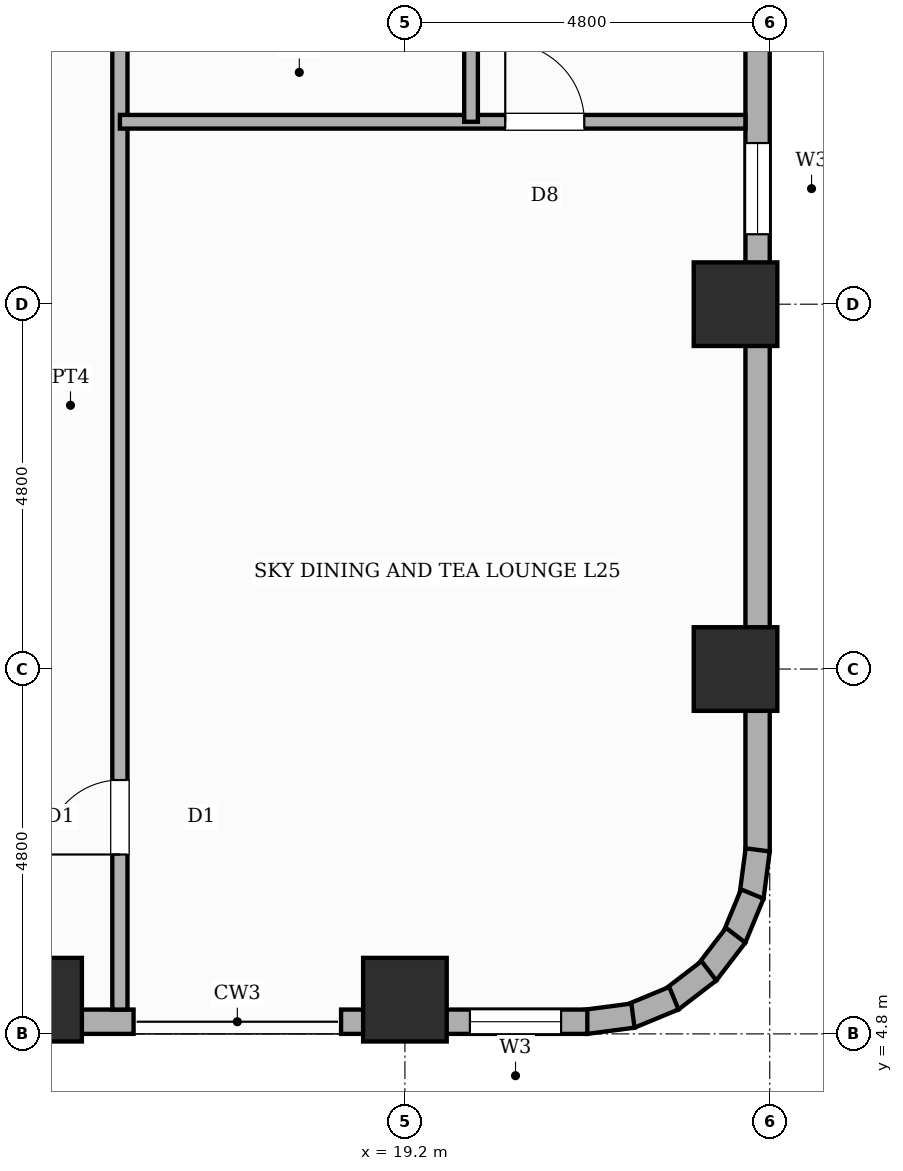
"""IFC4 building model, lengths in metres.
Left out: names, types, materials, properties, quantities, classifications, styles, units other than length and angle.
Written with IfcOpenShell. Run it as: python <this file> out.ifc"""

import sys

from ifc_helpers import new_model, si_unit, direction, frame, frame_2d, origin, origin_2d, place, context, subcontext, project, spatial, rectangle, extrude, element, fill, save


model = new_model("IFC4")
c1 = context("Model", 3, precision=1e-05, world=origin(), true_north=direction((0.0, 1.0)))
c2 = subcontext(c1, "Body", "Model", "MODEL_VIEW")
j1 = project(units=[si_unit("LENGTHUNIT", "METRE"), si_unit("PLANEANGLEUNIT", "RADIAN")], contexts=[c1])
p1 = place(None, origin())
s1 = spatial("IfcSite", under=j1, at=p1, CompositionType="ELEMENT")
p2 = place(p1, origin())
s2 = spatial("IfcBuilding", under=s1, at=p2, CompositionType="ELEMENT")
p3 = place(p2, frame((0.0, 0.0, 97.0)))
s3 = spatial("IfcBuildingStorey", under=s2, at=p3, CompositionType="ELEMENT", Elevation=97.0)
for number, where, z_axis, x_axis in (
    (1, (14.4, 5.25, 0.0), (0.0, 0.0, 1.0), (1.0, 0.0, 0.0)),
    (2, (19.2, 5.25, 0.0), (0.0, 0.0, 1.0), (1.0, 0.0, 0.0)),
    (3, (23.55, 9.6, 0.0), (0.0, 0.0, 1.0), (1.0, 0.0, 0.0)),
    (4, (23.55, 14.4, 0.0), (0.0, 0.0, 1.0), (1.0, 0.0, 0.0)),
):
    element("IfcColumn", number, at=place(p3, frame(where, z_axis=z_axis, x_axis=x_axis)), inside=s3, PredefinedType="COLUMN", context=c2, shape_type="SweptSolid", body=[
        extrude(rectangle(XDim=1.1, YDim=1.1, at=origin_2d()), origin(), (0.0, 0.0, 1.0), 4.8),
    ])
p4 = place(p3, frame((23.84, 26.4, 0.0), z_axis=(0.0, 0.0, 1.0), x_axis=(0.0, -1.0, 0.0)))
e5 = element("IfcWall", 5, at=p4, inside=s3, PredefinedType="STANDARD", context=c2, shape_type="SweptSolid", body=[
    extrude(rectangle(XDim=19.2, YDim=0.32, at=frame_2d((9.6, 0.0))), origin(), (0.0, 0.0, 1.0), 3.68),
])
p5 = place(p4, frame((9.88, 0.0, 0.8)))
e6 = element("IfcOpeningElement", 6, at=p5, cuts=e5, PredefinedType="OPENING", context=c2, shape_type="SweptSolid", body=[
    extrude(rectangle(XDim=1.2, YDim=1.8, at=frame_2d((0.6, 0.9))), frame((0.0, 0.17, 0.0), z_axis=(0.0, -1.0, 0.0), x_axis=(1.0, 0.0, 0.0)), (0.0, 0.0, 1.0), 0.34),
])
p6 = place(p4, frame((5.415, 0.0, 0.8)))
e7 = element("IfcOpeningElement", 7, at=p6, cuts=e5, PredefinedType="OPENING", context=c2, shape_type="SweptSolid", body=[
    extrude(rectangle(XDim=0.95, YDim=1.8, at=frame_2d((0.475, 0.9))), frame((0.0, 0.17, 0.0), z_axis=(0.0, -1.0, 0.0), x_axis=(1.0, 0.0, 0.0)), (0.0, 0.0, 1.0), 0.34),
])
p7 = place(p4, frame((0.965, 0.0, 0.45)))
e8 = element("IfcOpeningElement", 8, at=p7, cuts=e5, PredefinedType="OPENING", context=c2, shape_type="SweptSolid", body=[
    extrude(rectangle(XDim=0.6, YDim=1.8, at=frame_2d((0.3, 0.9))), frame((0.0, 0.17, 0.0), z_axis=(0.0, -1.0, 0.0), x_axis=(1.0, 0.0, 0.0)), (0.0, 0.0, 1.0), 0.34),
])
p8 = place(p3, frame((23.841, 7.221, 0.0), z_axis=(0.0, 0.0, 1.0), x_axis=(-0.130504898859, -0.991447664465, 0.0)))
e9 = element("IfcWall", 9, at=p8, inside=s3, PredefinedType="STANDARD", context=c2, shape_type="SweptSolid", body=[
    extrude(rectangle(XDim=0.627, YDim=0.32, at=frame_2d((0.313, 0.0))), origin(), (0.0, 0.0, 1.0), 4.5),
])
p9 = place(p3, frame((23.771, 6.64, 0.0), z_axis=(0.0, 0.0, 1.0), x_axis=(-0.382787856107, -0.923836271867, 0.0)))
e10 = element("IfcWall", 10, at=p9, inside=s3, PredefinedType="STANDARD", context=c2, shape_type="SweptSolid", body=[
    extrude(rectangle(XDim=0.626, YDim=0.32, at=frame_2d((0.313, 0.0))), origin(), (0.0, 0.0, 1.0), 4.5),
])
p10 = place(p3, frame((23.552, 6.097, 0.0), z_axis=(0.0, 0.0, 1.0), x_axis=(-0.608693302629, -0.793405610854, 0.0)))
e11 = element("IfcWall", 11, at=p10, inside=s3, PredefinedType="STANDARD", context=c2, shape_type="SweptSolid", body=[
    extrude(rectangle(XDim=0.626, YDim=0.32, at=frame_2d((0.313, 0.0))), origin(), (0.0, 0.0, 1.0), 4.5),
])
p11 = place(p3, frame((23.2, 5.63, 0.0), z_axis=(0.0, 0.0, 1.0), x_axis=(-0.7932174212, -0.608938521285, 0.0)))
e12 = element("IfcWall", 12, at=p11, inside=s3, PredefinedType="STANDARD", context=c2, shape_type="SweptSolid", body=[
    extrude(rectangle(XDim=0.627, YDim=0.32, at=frame_2d((0.313, 0.0))), origin(), (0.0, 0.0, 1.0), 4.5),
])
for number, where, z_axis, x_axis in (
    (13, (22.739, 5.269, 0.0), (0.0, 0.0, 1.0), (-0.924, -0.383, 0.0)),
    (14, (22.2, 5.04, 0.0), (0.0, 0.0, 1.0), (-0.991, -0.131, 0.0)),
):
    element("IfcWall", number, at=place(p3, frame(where, z_axis=z_axis, x_axis=x_axis)), inside=s3, PredefinedType="STANDARD", context=c2, shape_type="SweptSolid", body=[
        extrude(rectangle(XDim=0.626, YDim=0.32, at=frame_2d((0.313, 0.0))), origin(), (0.0, 0.0, 1.0), 4.5),
    ])
p12 = place(p3, frame((21.6, 4.96, 0.0), z_axis=(0.0, 0.0, 1.0), x_axis=(-1.0, 0.0, 0.0)))
e15 = element("IfcWall", 15, at=p12, inside=s3, PredefinedType="STANDARD", context=c2, shape_type="SweptSolid", body=[
    extrude(rectangle(XDim=3.24, YDim=0.32, at=frame_2d((1.62, 0.0))), origin(), (0.0, 0.0, 1.0), 3.68),
])
p13 = place(p12, frame((0.345, 0.0, 0.8)))
e16 = element("IfcOpeningElement", 16, at=p13, cuts=e15, PredefinedType="OPENING", context=c2, shape_type="SweptSolid", body=[
    extrude(rectangle(XDim=1.2, YDim=1.8, at=frame_2d((0.6, 0.9))), frame((0.0, 0.17, 0.0), z_axis=(0.0, -1.0, 0.0), x_axis=(1.0, 0.0, 0.0)), (0.0, 0.0, 1.0), 0.34),
])
p14 = place(p3, frame((15.63, 4.96, 0.0), z_axis=(0.0, 0.0, 1.0), x_axis=(-1.0, 0.0, 0.0)))
e17 = element("IfcWall", 17, at=p14, inside=s3, PredefinedType="STANDARD", context=c2, shape_type="SweptSolid", body=[
    extrude(rectangle(XDim=2.21, YDim=0.32, at=frame_2d((1.105, 0.0))), origin(), (0.0, 0.0, 1.0), 3.68),
])
p15 = place(p3, frame((15.45, 5.12, 0.0), z_axis=(0.0, 0.0, 1.0), x_axis=(0.0, 1.0, 0.0)))
e18 = element("IfcWall", 18, at=p15, inside=s3, PredefinedType="PARTITIONING", context=c2, shape_type="SweptSolid", body=[
    extrude(rectangle(XDim=20.63, YDim=0.2, at=frame_2d((10.315, 0.0))), origin(), (0.0, 0.0, 1.0), 4.5),
])
p16 = place(p15, frame((2.04, 0.0, 0.0)))
e19 = element("IfcOpeningElement", 19, at=p16, cuts=e18, PredefinedType="OPENING", context=c2, shape_type="SweptSolid", body=[
    extrude(rectangle(XDim=0.98, YDim=2.18, at=frame_2d((0.49, 1.09))), frame((0.0, 0.11, 0.0), z_axis=(0.0, -1.0, 0.0), x_axis=(1.0, 0.0, 0.0)), (0.0, 0.0, 1.0), 0.22),
])
p17 = place(p15, frame((12.88, 0.0, 0.0)))
e20 = element("IfcOpeningElement", 20, at=p17, cuts=e18, PredefinedType="OPENING", context=c2, shape_type="SweptSolid", body=[
    extrude(rectangle(XDim=0.95, YDim=2.15, at=frame_2d((0.475, 1.075))), frame((0.0, 0.11, 0.0), z_axis=(0.0, -1.0, 0.0), x_axis=(1.0, 0.0, 0.0)), (0.0, 0.0, 1.0), 0.22),
])
p18 = place(p3, frame((15.45, 16.8, 0.0), z_axis=(0.0, 0.0, 1.0), x_axis=(1.0, 0.0, 0.0)))
e21 = element("IfcWall", 21, at=p18, inside=s3, PredefinedType="PLUMBINGWALL", context=c2, shape_type="SweptSolid", body=[
    extrude(rectangle(XDim=8.23, YDim=0.18, at=frame_2d((4.115, 0.0))), origin(), (0.0, 0.0, 1.0), 4.13),
])
p19 = place(p18, frame((5.07, 0.0, 0.0)))
e22 = element("IfcOpeningElement", 22, at=p19, cuts=e21, PredefinedType="OPENING", context=c2, shape_type="SweptSolid", body=[
    extrude(rectangle(XDim=1.04, YDim=2.15, at=frame_2d((0.52, 1.075))), frame((0.0, 0.1, 0.0), z_axis=(0.0, -1.0, 0.0), x_axis=(1.0, 0.0, 0.0)), (0.0, 0.0, 1.0), 0.2),
])
p20 = place(p3, frame((20.07, 16.8, 0.0), z_axis=(0.0, 0.0, 1.0), x_axis=(0.0, 1.0, 0.0)))
e23 = element("IfcWall", 23, at=p20, inside=s3, PredefinedType="PLUMBINGWALL", context=c2, shape_type="SweptSolid", body=[
    extrude(rectangle(XDim=8.95, YDim=0.18, at=frame_2d((4.475, 0.0))), origin(), (0.0, 0.0, 1.0), 4.5),
])
p21 = place(p5, origin())
e24 = element("IfcWindow", 24, at=p21, inside=s3, PartitioningType="SINGLE_PANEL", PredefinedType="WINDOW", context=c2, shape_type="SweptSolid", body=[
    extrude(rectangle(XDim=1.2, YDim=1.8, at=frame_2d((0.6, 0.9))), frame((0.0, 0.03, 0.0), z_axis=(0.0, -1.0, 0.0), x_axis=(1.0, 0.0, 0.0)), (0.0, 0.0, 1.0), 0.06),
])
fill(e6, e24)
p22 = place(p13, origin())
e25 = element("IfcWindow", 25, at=p22, inside=s3, PartitioningType="SINGLE_PANEL", PredefinedType="WINDOW", context=c2, shape_type="SweptSolid", body=[
    extrude(rectangle(XDim=1.2, YDim=1.8, at=frame_2d((0.6, 0.9))), frame((0.0, 0.03, 0.0), z_axis=(0.0, -1.0, 0.0), x_axis=(1.0, 0.0, 0.0)), (0.0, 0.0, 1.0), 0.06),
])
fill(e16, e25)
p23 = place(p16, origin())
e26 = element("IfcDoor", 26, at=p23, inside=s3, OperationType="SINGLE_SWING_LEFT", PredefinedType="DOOR", context=c2, shape_type="SweptSolid", body=[
    extrude(rectangle(XDim=0.98, YDim=2.18, at=frame_2d((0.49, 1.09))), frame((0.0, 0.025, 0.0), z_axis=(0.0, -1.0, 0.0), x_axis=(1.0, 0.0, 0.0)), (0.0, 0.0, 1.0), 0.05),
])
fill(e19, e26)
p24 = place(p19, origin())
e27 = element("IfcDoor", 27, at=p24, inside=s3, OperationType="SINGLE_SWING_LEFT", PredefinedType="DOOR", context=c2, shape_type="SweptSolid", body=[
    extrude(rectangle(XDim=1.04, YDim=2.15, at=frame_2d((0.52, 1.075))), frame((0.0, 0.025, 0.0), z_axis=(0.0, -1.0, 0.0), x_axis=(1.0, 0.0, 0.0)), (0.0, 0.0, 1.0), 0.05),
])
fill(e22, e27)
save(model, sys.argv[1])
